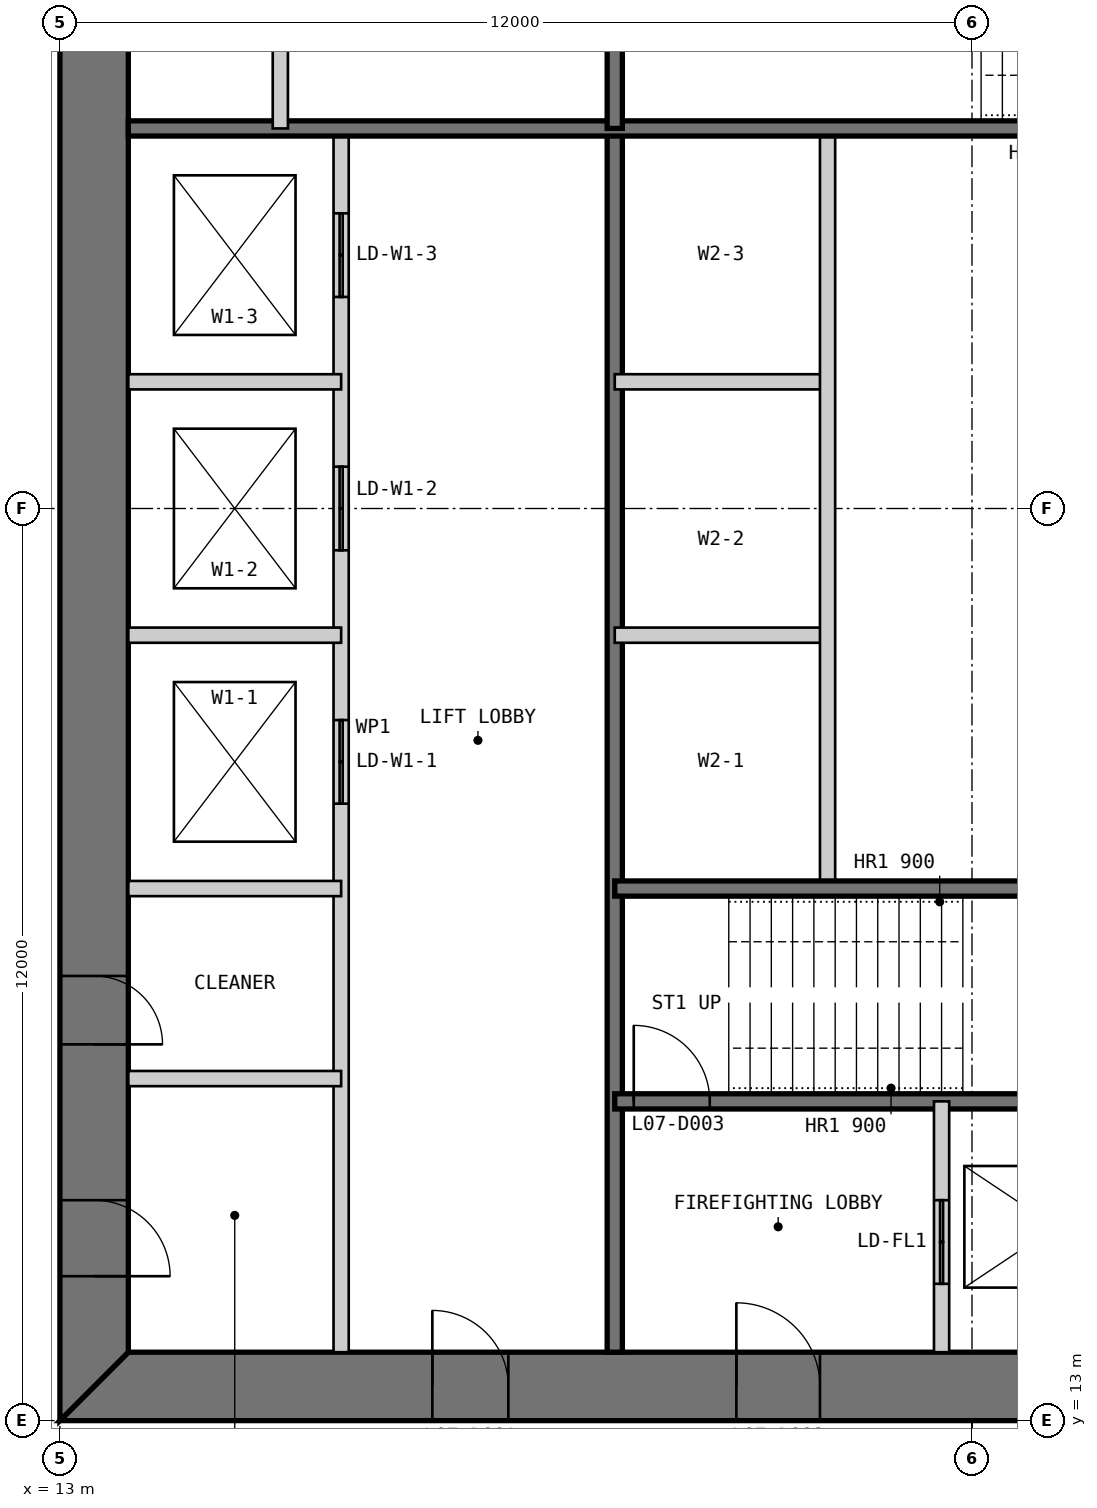
"""IFC4 building model, lengths in metres.
Left out: names, types, materials, properties, quantities, classifications, styles, units other than length and angle.
Written with IfcOpenShell. Run it as: python <this file> out.ifc"""

import sys

from ifc_helpers import new_model, si_unit, direction, frame, frame_2d, origin, place, context, subcontext, project, spatial, polyline, rectangle, outline, extrude, element, fill, save


model = new_model("IFC4")
c1 = context("Model", 3, precision=1e-05, world=origin(), true_north=direction((0.0, 1.0)))
c2 = subcontext(c1, "Body", "Model", "MODEL_VIEW")
j1 = project(units=[si_unit("LENGTHUNIT", "METRE"), si_unit("PLANEANGLEUNIT", "RADIAN")], contexts=[c1])
p1 = place(None, origin())
s1 = spatial("IfcSite", under=j1, at=p1, CompositionType="ELEMENT")
p2 = place(p1, origin())
s2 = spatial("IfcBuilding", under=s1, at=p2, CompositionType="ELEMENT")
p3 = place(p2, frame((0.0, 0.0, 35.0)))
s3 = spatial("IfcBuildingStorey", under=s2, at=p3, CompositionType="ELEMENT", Elevation=35.0)
p4 = place(p3, frame((13.0, 13.45, 0.0), z_axis=(0.0, 0.0, 1.0), x_axis=(1.0, 0.0, 0.0)))
e1 = element("IfcWall", 1, at=p4, inside=s3, PredefinedType="SHEAR", context=c2, shape_type="SweptSolid", body=[
    extrude(outline(polyline([(0.0, -0.45), (24.0, -0.45), (23.1, 0.45), (0.9, 0.45), (0.0, -0.45)])), origin(), (0.0, 0.0, 1.0), 4.0),
])
p5 = place(p4, frame((4.9, 0.0, 0.0)))
e2 = element("IfcOpeningElement", 2, at=p5, cuts=e1, PredefinedType="OPENING", context=c2, shape_type="SweptSolid", body=[
    extrude(rectangle(XDim=1.0, YDim=2.2, at=frame_2d((0.5, 1.1))), frame((0.0, 0.46, 0.0), z_axis=(0.0, -1.0, 0.0), x_axis=(1.0, 0.0, 0.0)), (0.0, 0.0, 1.0), 0.92),
])
p6 = place(p4, frame((8.9, 0.0, 0.0)))
e3 = element("IfcOpeningElement", 3, at=p6, cuts=e1, PredefinedType="OPENING", context=c2, shape_type="SweptSolid", body=[
    extrude(rectangle(XDim=1.1, YDim=2.2, at=frame_2d((0.55, 1.1))), frame((0.0, 0.46, 0.0), z_axis=(0.0, -1.0, 0.0), x_axis=(1.0, 0.0, 0.0)), (0.0, 0.0, 1.0), 0.92),
])
p7 = place(p4, frame((15.05, 0.0, 0.0)))
e4 = element("IfcOpeningElement", 4, at=p7, cuts=e1, PredefinedType="OPENING", context=c2, shape_type="SweptSolid", body=[
    extrude(rectangle(XDim=0.9, YDim=2.2, at=frame_2d((0.45, 1.1))), frame((0.0, 0.46, 0.0), z_axis=(0.0, -1.0, 0.0), x_axis=(1.0, 0.0, 0.0)), (0.0, 0.0, 1.0), 0.92),
])
p8 = place(p4, frame((17.9, 0.0, 0.0)))
e5 = element("IfcOpeningElement", 5, at=p8, cuts=e1, PredefinedType="OPENING", context=c2, shape_type="SweptSolid", body=[
    extrude(rectangle(XDim=1.0, YDim=2.2, at=frame_2d((0.5, 1.1))), frame((0.0, 0.46, 0.0), z_axis=(0.0, -1.0, 0.0), x_axis=(1.0, 0.0, 0.0)), (0.0, 0.0, 1.0), 0.92),
])
p9 = place(p4, frame((21.4, 0.0, 0.0)))
e6 = element("IfcOpeningElement", 6, at=p9, cuts=e1, PredefinedType="OPENING", context=c2, shape_type="SweptSolid", body=[
    extrude(rectangle(XDim=1.0, YDim=2.2, at=frame_2d((0.5, 1.1))), frame((0.0, 0.46, 0.0), z_axis=(0.0, -1.0, 0.0), x_axis=(1.0, 0.0, 0.0)), (0.0, 0.0, 1.0), 0.92),
])
p10 = place(p3, frame((13.45, 36.1, 0.0), z_axis=(0.0, 0.0, 1.0), x_axis=(0.0, -1.0, 0.0)))
e7 = element("IfcWall", 7, at=p10, inside=s3, PredefinedType="SHEAR", context=c2, shape_type="SweptSolid", body=[
    extrude(outline(polyline([(-0.9, -0.45), (23.1, -0.45), (22.2, 0.45), (0.0, 0.45), (-0.9, -0.45)])), origin(), (0.0, 0.0, 1.0), 4.0),
])
p11 = place(p10, frame((20.2, 0.0, 0.0)))
e8 = element("IfcOpeningElement", 8, at=p11, cuts=e7, PredefinedType="OPENING", context=c2, shape_type="SweptSolid", body=[
    extrude(rectangle(XDim=1.0, YDim=2.2, at=frame_2d((0.5, 1.1))), frame((0.0, 0.46, 0.0), z_axis=(0.0, -1.0, 0.0), x_axis=(1.0, 0.0, 0.0)), (0.0, 0.0, 1.0), 0.92),
])
p12 = place(p10, frame((17.25, 0.0, 0.0)))
e9 = element("IfcOpeningElement", 9, at=p12, cuts=e7, PredefinedType="OPENING", context=c2, shape_type="SweptSolid", body=[
    extrude(rectangle(XDim=0.9, YDim=2.2, at=frame_2d((0.45, 1.1))), frame((0.0, 0.46, 0.0), z_axis=(0.0, -1.0, 0.0), x_axis=(1.0, 0.0, 0.0)), (0.0, 0.0, 1.0), 0.92),
])
p13 = place(p3, frame((16.7, 13.9, 0.0), z_axis=(0.0, 0.0, 1.0), x_axis=(0.0, 1.0, 0.0)))
e10 = element("IfcWall", 10, at=p13, inside=s3, PredefinedType="PARTITIONING", context=c2, shape_type="SweptSolid", body=[
    extrude(rectangle(XDim=16.1, YDim=0.2, at=frame_2d((8.05, 0.0))), origin(), (0.0, 0.0, 1.0), 3.8),
])
p14 = place(p13, frame((7.217, 0.0, 0.0)))
e11 = element("IfcOpeningElement", 11, at=p14, cuts=e10, PredefinedType="OPENING", context=c2, shape_type="SweptSolid", body=[
    extrude(rectangle(XDim=1.1, YDim=2.2, at=frame_2d((0.55, 1.1))), frame((0.0, 0.11, 0.0), z_axis=(0.0, -1.0, 0.0), x_axis=(1.0, 0.0, 0.0)), (0.0, 0.0, 1.0), 0.22),
])
p15 = place(p13, frame((10.55, 0.0, 0.0)))
e12 = element("IfcOpeningElement", 12, at=p15, cuts=e10, PredefinedType="OPENING", context=c2, shape_type="SweptSolid", body=[
    extrude(rectangle(XDim=1.1, YDim=2.2, at=frame_2d((0.55, 1.1))), frame((0.0, 0.11, 0.0), z_axis=(0.0, -1.0, 0.0), x_axis=(1.0, 0.0, 0.0)), (0.0, 0.0, 1.0), 0.22),
])
p16 = place(p13, frame((13.883, 0.0, 0.0)))
e13 = element("IfcOpeningElement", 13, at=p16, cuts=e10, PredefinedType="OPENING", context=c2, shape_type="SweptSolid", body=[
    extrude(rectangle(XDim=1.1, YDim=2.2, at=frame_2d((0.55, 1.1))), frame((0.0, 0.11, 0.0), z_axis=(0.0, -1.0, 0.0), x_axis=(1.0, 0.0, 0.0)), (0.0, 0.0, 1.0), 0.22),
])
p17 = place(p3, frame((20.3, 13.9, 0.0), z_axis=(0.0, 0.0, 1.0), x_axis=(0.0, 1.0, 0.0)))
e14 = element("IfcWall", 14, at=p17, inside=s3, PredefinedType="SOLIDWALL", context=c2, shape_type="SweptSolid", body=[
    extrude(rectangle(XDim=16.1, YDim=0.2, at=frame_2d((8.05, 0.0))), origin(), (0.0, 0.0, 1.0), 3.8),
])
for number, where, z_axis, x_axis in (
    (15, (13.9, 20.0, 0.0), (0.0, 0.0, 1.0), (1.0, 0.0, 0.0)),
    (16, (13.9, 23.333, 0.0), (0.0, 0.0, 1.0), (1.0, 0.0, 0.0)),
    (17, (13.9, 26.667, 0.0), (0.0, 0.0, 1.0), (1.0, 0.0, 0.0)),
    (18, (20.3, 23.333, 0.0), (0.0, 0.0, 1.0), (1.0, 0.0, 0.0)),
    (19, (20.3, 26.667, 0.0), (0.0, 0.0, 1.0), (1.0, 0.0, 0.0)),
):
    element("IfcWall", number, at=place(p3, frame(where, z_axis=z_axis, x_axis=x_axis)), inside=s3, PredefinedType="PARTITIONING", context=c2, shape_type="SweptSolid", body=[
        extrude(rectangle(XDim=2.8, YDim=0.2, at=frame_2d((1.4, 0.0))), origin(), (0.0, 0.0, 1.0), 3.8),
    ])
p18 = place(p3, frame((23.1, 20.0, 0.0), z_axis=(0.0, 0.0, 1.0), x_axis=(0.0, 1.0, 0.0)))
e20 = element("IfcWall", 20, at=p18, inside=s3, PredefinedType="PARTITIONING", context=c2, shape_type="SweptSolid", body=[
    extrude(rectangle(XDim=10.0, YDim=0.2, at=frame_2d((5.0, 0.0))), origin(), (0.0, 0.0, 1.0), 3.8),
])
p19 = place(p3, frame((20.3, 17.2, 0.0), z_axis=(0.0, 0.0, 1.0), x_axis=(1.0, 0.0, 0.0)))
e21 = element("IfcWall", 21, at=p19, inside=s3, PredefinedType="SOLIDWALL", context=c2, shape_type="SweptSolid", body=[
    extrude(rectangle(XDim=9.4, YDim=0.2, at=frame_2d((4.7, 0.0))), origin(), (0.0, 0.0, 1.0), 3.8),
])
p20 = place(p19, frame((0.25, 0.0, 0.0)))
e22 = element("IfcOpeningElement", 22, at=p20, cuts=e21, PredefinedType="OPENING", context=c2, shape_type="SweptSolid", body=[
    extrude(rectangle(XDim=1.0, YDim=2.2, at=frame_2d((0.5, 1.1))), frame((0.0, 0.11, 0.0), z_axis=(0.0, -1.0, 0.0), x_axis=(1.0, 0.0, 0.0)), (0.0, 0.0, 1.0), 0.22),
])
p21 = place(p3, frame((20.3, 20.0, 0.0), z_axis=(0.0, 0.0, 1.0), x_axis=(1.0, 0.0, 0.0)))
e23 = element("IfcWall", 23, at=p21, inside=s3, PredefinedType="SOLIDWALL", context=c2, shape_type="SweptSolid", body=[
    extrude(rectangle(XDim=15.8, YDim=0.2, at=frame_2d((7.9, 0.0))), origin(), (0.0, 0.0, 1.0), 3.8),
])
p22 = place(p3, frame((24.6, 13.9, 0.0), z_axis=(0.0, 0.0, 1.0), x_axis=(0.0, 1.0, 0.0)))
e24 = element("IfcWall", 24, at=p22, inside=s3, PredefinedType="PARTITIONING", context=c2, shape_type="SweptSolid", body=[
    extrude(rectangle(XDim=3.3, YDim=0.2, at=frame_2d((1.65, 0.0))), origin(), (0.0, 0.0, 1.0), 3.8),
])
p23 = place(p22, frame((0.9, 0.0, 0.0)))
e25 = element("IfcOpeningElement", 25, at=p23, cuts=e24, PredefinedType="OPENING", context=c2, shape_type="SweptSolid", body=[
    extrude(rectangle(XDim=1.1, YDim=2.2, at=frame_2d((0.55, 1.1))), frame((0.0, 0.11, 0.0), z_axis=(0.0, -1.0, 0.0), x_axis=(1.0, 0.0, 0.0)), (0.0, 0.0, 1.0), 0.22),
])
p24 = place(p3, frame((13.9, 17.5, 0.0), z_axis=(0.0, 0.0, 1.0), x_axis=(1.0, 0.0, 0.0)))
e26 = element("IfcWall", 26, at=p24, inside=s3, PredefinedType="PARTITIONING", context=c2, shape_type="SweptSolid", body=[
    extrude(rectangle(XDim=2.8, YDim=0.2, at=frame_2d((1.4, 0.0))), origin(), (0.0, 0.0, 1.0), 3.8),
])
p25 = place(p3, frame((29.7, 30.0, 0.0), z_axis=(0.0, 0.0, 1.0), x_axis=(-1.0, 0.0, 0.0)))
e27 = element("IfcWall", 27, at=p25, inside=s3, PredefinedType="SOLIDWALL", context=c2, shape_type="SweptSolid", body=[
    extrude(rectangle(XDim=15.8, YDim=0.2, at=frame_2d((7.9, 0.0))), origin(), (0.0, 0.0, 1.0), 3.8),
])
p26 = place(p3, frame((20.3, 36.1, 0.0), z_axis=(0.0, 0.0, 1.0), x_axis=(0.0, -1.0, 0.0)))
e28 = element("IfcWall", 28, at=p26, inside=s3, PredefinedType="SOLIDWALL", context=c2, shape_type="SweptSolid", body=[
    extrude(rectangle(XDim=6.1, YDim=0.2, at=frame_2d((3.05, 0.0))), origin(), (0.0, 0.0, 1.0), 3.8),
])
p27 = place(p3, frame((15.9, 36.1, 0.0), z_axis=(0.0, 0.0, 1.0), x_axis=(0.0, -1.0, 0.0)))
e29 = element("IfcWall", 29, at=p27, inside=s3, PredefinedType="PARTITIONING", context=c2, shape_type="SweptSolid", body=[
    extrude(rectangle(XDim=6.1, YDim=0.2, at=frame_2d((3.05, 0.0))), origin(), (0.0, 0.0, 1.0), 3.8),
])
p28 = place(p5, origin())
e30 = element("IfcDoor", 30, at=p28, inside=s3, OperationType="SINGLE_SWING_LEFT", PredefinedType="DOOR", context=c2, shape_type="SweptSolid", body=[
    extrude(rectangle(XDim=1.0, YDim=2.2, at=frame_2d((0.5, 1.1))), frame((0.0, 0.025, 0.0), z_axis=(0.0, -1.0, 0.0), x_axis=(1.0, 0.0, 0.0)), (0.0, 0.0, 1.0), 0.05),
    extrude(outline(polyline([(0.0, 0.0), (0.04, 0.0), (0.04, 2.16), (0.96, 2.16), (0.96, 0.0), (1.0, 0.0), (1.0, 2.2), (0.0, 2.2), (0.0, 0.0)])), frame((0.0, 0.3, 0.0), z_axis=(0.0, -1.0, 0.0), x_axis=(1.0, 0.0, 0.0)), (0.0, 0.0, 1.0), 0.6),
])
fill(e2, e30)
p29 = place(p6, origin())
e31 = element("IfcDoor", 31, at=p29, inside=s3, OperationType="SINGLE_SWING_LEFT", PredefinedType="DOOR", context=c2, shape_type="SweptSolid", body=[
    extrude(rectangle(XDim=1.1, YDim=2.2, at=frame_2d((0.55, 1.1))), frame((0.0, 0.025, 0.0), z_axis=(0.0, -1.0, 0.0), x_axis=(1.0, 0.0, 0.0)), (0.0, 0.0, 1.0), 0.05),
    extrude(outline(polyline([(0.0, 0.0), (0.04, 0.0), (0.04, 2.16), (1.06, 2.16), (1.06, 0.0), (1.1, 0.0), (1.1, 2.2), (0.0, 2.2), (0.0, 0.0)])), frame((0.0, 0.3, 0.0), z_axis=(0.0, -1.0, 0.0), x_axis=(1.0, 0.0, 0.0)), (0.0, 0.0, 1.0), 0.6),
])
fill(e3, e31)
p30 = place(p20, origin())
e32 = element("IfcDoor", 32, at=p30, inside=s3, OperationType="SINGLE_SWING_LEFT", PredefinedType="DOOR", context=c2, shape_type="SweptSolid", body=[
    extrude(rectangle(XDim=1.0, YDim=2.2, at=frame_2d((0.5, 1.1))), frame((0.0, 0.025, 0.0), z_axis=(0.0, -1.0, 0.0), x_axis=(1.0, 0.0, 0.0)), (0.0, 0.0, 1.0), 0.05),
])
fill(e22, e32)
p31 = place(p11, origin())
e33 = element("IfcDoor", 33, at=p31, inside=s3, OperationType="SINGLE_SWING_RIGHT", PredefinedType="DOOR", context=c2, shape_type="SweptSolid", body=[
    extrude(rectangle(XDim=1.0, YDim=2.2, at=frame_2d((0.5, 1.1))), frame((0.0, 0.025, 0.0), z_axis=(0.0, -1.0, 0.0), x_axis=(1.0, 0.0, 0.0)), (0.0, 0.0, 1.0), 0.05),
    extrude(outline(polyline([(0.0, 0.0), (0.04, 0.0), (0.04, 2.16), (0.96, 2.16), (0.96, 0.0), (1.0, 0.0), (1.0, 2.2), (0.0, 2.2), (0.0, 0.0)])), frame((0.0, 0.3, 0.0), z_axis=(0.0, -1.0, 0.0), x_axis=(1.0, 0.0, 0.0)), (0.0, 0.0, 1.0), 0.6),
])
fill(e8, e33)
p32 = place(p12, origin())
e34 = element("IfcDoor", 34, at=p32, inside=s3, OperationType="SINGLE_SWING_RIGHT", PredefinedType="DOOR", context=c2, shape_type="SweptSolid", body=[
    extrude(rectangle(XDim=0.9, YDim=2.2, at=frame_2d((0.45, 1.1))), frame((0.0, 0.025, 0.0), z_axis=(0.0, -1.0, 0.0), x_axis=(1.0, 0.0, 0.0)), (0.0, 0.0, 1.0), 0.05),
    extrude(outline(polyline([(0.0, 0.0), (0.04, 0.0), (0.04, 2.16), (0.86, 2.16), (0.86, 0.0), (0.9, 0.0), (0.9, 2.2), (0.0, 2.2), (0.0, 0.0)])), frame((0.0, 0.3, 0.0), z_axis=(0.0, -1.0, 0.0), x_axis=(1.0, 0.0, 0.0)), (0.0, 0.0, 1.0), 0.6),
])
fill(e9, e34)
p33 = place(p23, origin())
e35 = element("IfcDoor", 35, at=p33, inside=s3, OperationType="DOUBLE_DOOR_SLIDING", PredefinedType="DOOR", context=c2, shape_type="SweptSolid", body=[
    extrude(rectangle(XDim=1.1, YDim=2.2, at=frame_2d((0.55, 1.1))), frame((0.0, 0.025, 0.0), z_axis=(0.0, -1.0, 0.0), x_axis=(1.0, 0.0, 0.0)), (0.0, 0.0, 1.0), 0.05),
])
fill(e25, e35)
p34 = place(p14, origin())
e36 = element("IfcDoor", 36, at=p34, inside=s3, OperationType="DOUBLE_DOOR_SLIDING", PredefinedType="DOOR", context=c2, shape_type="SweptSolid", body=[
    extrude(rectangle(XDim=1.1, YDim=2.2, at=frame_2d((0.55, 1.1))), frame((0.0, 0.025, 0.0), z_axis=(0.0, -1.0, 0.0), x_axis=(1.0, 0.0, 0.0)), (0.0, 0.0, 1.0), 0.05),
])
fill(e11, e36)
p35 = place(p15, origin())
e37 = element("IfcDoor", 37, at=p35, inside=s3, OperationType="DOUBLE_DOOR_SLIDING", PredefinedType="DOOR", context=c2, shape_type="SweptSolid", body=[
    extrude(rectangle(XDim=1.1, YDim=2.2, at=frame_2d((0.55, 1.1))), frame((0.0, 0.025, 0.0), z_axis=(0.0, -1.0, 0.0), x_axis=(1.0, 0.0, 0.0)), (0.0, 0.0, 1.0), 0.05),
])
fill(e12, e37)
p36 = place(p16, origin())
e38 = element("IfcDoor", 38, at=p36, inside=s3, OperationType="DOUBLE_DOOR_SLIDING", PredefinedType="DOOR", context=c2, shape_type="SweptSolid", body=[
    extrude(rectangle(XDim=1.1, YDim=2.2, at=frame_2d((0.55, 1.1))), frame((0.0, 0.025, 0.0), z_axis=(0.0, -1.0, 0.0), x_axis=(1.0, 0.0, 0.0)), (0.0, 0.0, 1.0), 0.05),
])
fill(e13, e38)
save(model, sys.argv[1])
